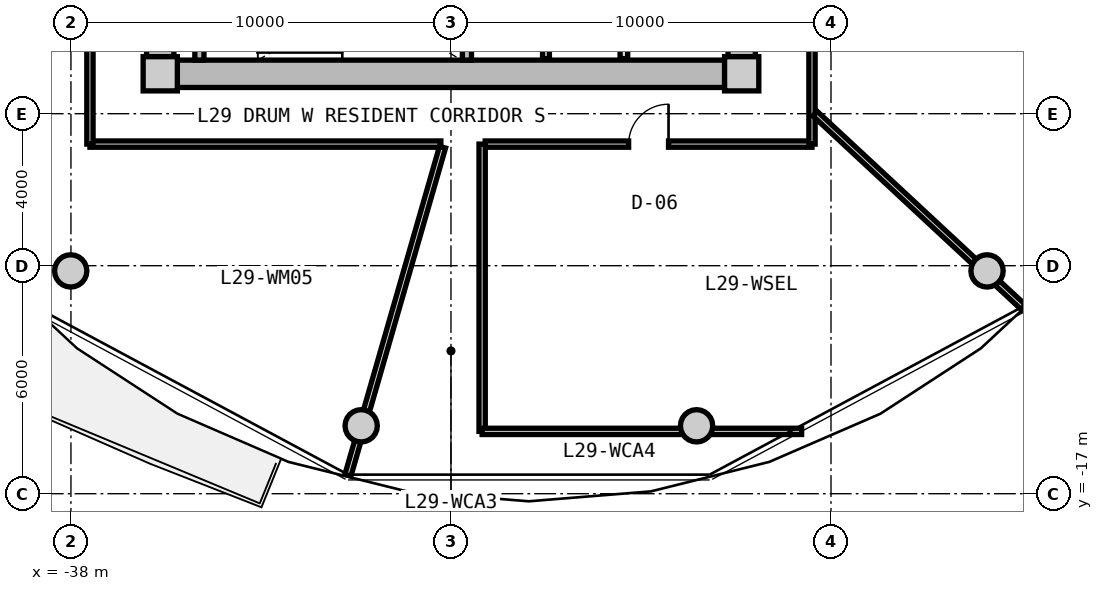
"""IFC4 building model, lengths in metres.
Left out: names, types, materials, properties, quantities, classifications, styles, units other than length and angle.
Written with IfcOpenShell. Run it as: python <this file> out.ifc"""

import sys

from ifc_helpers import new_model, si_unit, direction, frame, frame_2d, origin, origin_2d, place, context, subcontext, project, spatial, rectangle, circle, extrude, source, transform, mapped, element, fill, save


model = new_model("IFC4")
c1 = context("Model", 3, precision=1e-05, world=origin(), true_north=direction((0.0, 1.0)))
c2 = subcontext(c1, "Body", "Model", "MODEL_VIEW")
j1 = project(units=[si_unit("LENGTHUNIT", "METRE"), si_unit("PLANEANGLEUNIT", "RADIAN")], contexts=[c1])
p1 = place(None, origin())
s1 = spatial("IfcSite", under=j1, at=p1, CompositionType="ELEMENT")
p2 = place(p1, origin())
s2 = spatial("IfcBuilding", under=s1, at=p2, CompositionType="ELEMENT")
p3 = place(p2, frame((0.0, 0.0, 96.25)))
s3 = spatial("IfcBuildingStorey", under=s2, at=p3, CompositionType="ELEMENT", Elevation=96.25)
m1 = source(origin(), c2, "Body", "SweptSolid", [
    extrude(rectangle(XDim=0.9, YDim=0.9, at=origin_2d()), origin(), (0.0, 0.0, 1.0), 3.05),
])
for number, where, z_axis, x_axis in (
    (1, (-35.65, -5.95, 0.0), (0.0, 0.0, 1.0), (1.0, 0.0, 0.0)),
    (2, (-20.35, -5.95, 0.0), (0.0, 0.0, 1.0), (1.0, 0.0, 0.0)),
):
    element("IfcColumn", number, at=place(p3, frame(where, z_axis=z_axis, x_axis=x_axis)), inside=s3, PredefinedType="COLUMN", context=c2, shape_type="MappedRepresentation", body=[
        mapped(m1, transform((0.0, 0.0, 0.0), x_axis=(1.0, 0.0, 0.0), y_axis=(0.0, 1.0, 0.0), z_axis=(0.0, 0.0, 1.0), scale=1.0)),
    ])
m2 = source(origin(), c2, "Body", "SweptSolid", [
    extrude(rectangle(XDim=14.4, YDim=0.72, at=frame_2d((7.2, 0.0))), origin(), (0.0, 0.0, 1.0), 2.79),
])
p4 = place(p3, frame((-20.8, -5.95, 0.0), z_axis=(0.0, 0.0, 1.0), x_axis=(-1.0, 0.0, 0.0)))
e3 = element("IfcWall", 3, at=p4, inside=s3, PredefinedType="SHEAR", context=c2, shape_type="MappedRepresentation", body=[
    mapped(m2, transform((0.0, 0.0, 0.0), x_axis=(1.0, 0.0, 0.0), y_axis=(0.0, 1.0, 0.0), z_axis=(0.0, 0.0, 1.0), scale=1.0)),
])
m3 = source(origin(), c2, "Body", "SweptSolid", [
    extrude(rectangle(XDim=11.0, YDim=0.72, at=frame_2d((5.5, 0.0))), origin(), (0.0, 0.0, 1.0), 2.79),
])
p5 = place(p3, frame((-35.65, -5.5, 0.0), z_axis=(0.0, 0.0, 1.0), x_axis=(0.0, 1.0, 0.0)))
e4 = element("IfcWall", 4, at=p5, inside=s3, PredefinedType="SHEAR", context=c2, shape_type="MappedRepresentation", body=[
    mapped(m3, transform((0.0, 0.0, 0.0), x_axis=(1.0, 0.0, 0.0), y_axis=(0.0, 1.0, 0.0), z_axis=(0.0, 0.0, 1.0), scale=1.0)),
])
p6 = place(p5, frame((3.8, 0.0, 0.0)))
e5 = element("IfcOpeningElement", 5, at=p6, cuts=e4, PredefinedType="OPENING", context=c2, shape_type="SweptSolid", body=[
    extrude(rectangle(XDim=1.2, YDim=2.15, at=frame_2d((0.6, 1.075))), frame((0.0, 0.37, 0.0), z_axis=(0.0, -1.0, 0.0), x_axis=(1.0, 0.0, 0.0)), (0.0, 0.0, 1.0), 0.74),
])
p7 = place(p3, frame((-20.35, 5.5, 0.0), z_axis=(0.0, 0.0, 1.0), x_axis=(0.0, -1.0, 0.0)))
e6 = element("IfcWall", 6, at=p7, inside=s3, PredefinedType="SHEAR", context=c2, shape_type="MappedRepresentation", body=[
    mapped(m3, transform((0.0, 0.0, 0.0), x_axis=(1.0, 0.0, 0.0), y_axis=(0.0, 1.0, 0.0), z_axis=(0.0, 0.0, 1.0), scale=1.0)),
])
p8 = place(p7, frame((5.65, 0.0, 0.0)))
e7 = element("IfcOpeningElement", 7, at=p8, cuts=e6, PredefinedType="OPENING", context=c2, shape_type="SweptSolid", body=[
    extrude(rectangle(XDim=1.2, YDim=2.15, at=frame_2d((0.6, 1.075))), frame((0.0, 0.37, 0.0), z_axis=(0.0, -1.0, 0.0), x_axis=(1.0, 0.0, 0.0)), (0.0, 0.0, 1.0), 0.74),
])
p9 = place(p7, frame((9.3, 0.0, 0.0)))
e8 = element("IfcOpeningElement", 8, at=p9, cuts=e6, PredefinedType="OPENING", context=c2, shape_type="SweptSolid", body=[
    extrude(rectangle(XDim=1.0, YDim=2.1, at=frame_2d((0.5, 1.05))), frame((0.0, 0.37, 0.0), z_axis=(0.0, -1.0, 0.0), x_axis=(1.0, 0.0, 0.0)), (0.0, 0.0, 1.0), 0.74),
])
m4 = source(origin(), c2, "Body", "SweptSolid", [
    extrude(circle(Radius=0.425, at=origin_2d()), origin(), (0.0, 0.0, 1.0), 3.05),
])
for number, where, z_axis, x_axis in (
    (9, (-38.006, -11.137, 0.0), (0.0, 0.0, 1.0), (1.0, 0.0, 0.0)),
    (10, (-30.363, -15.213, 0.0), (0.0, 0.0, 1.0), (1.0, 0.0, 0.0)),
    (11, (-21.537, -15.213, 0.0), (0.0, 0.0, 1.0), (1.0, 0.0, 0.0)),
    (12, (-13.894, -11.137, 0.0), (0.0, 0.0, 1.0), (1.0, 0.0, 0.0)),
):
    element("IfcColumn", number, at=place(p3, frame(where, z_axis=z_axis, x_axis=x_axis)), inside=s3, PredefinedType="COLUMN", context=c2, shape_type="MappedRepresentation", body=[
        mapped(m4, transform((0.0, 0.0, 0.0), x_axis=(1.0, 0.0, 0.0), y_axis=(0.0, 1.0, 0.0), z_axis=(0.0, 0.0, 1.0), scale=1.0)),
    ])
m5 = source(origin(), c2, "Body", "SweptSolid", [
    extrude(rectangle(XDim=3.14, YDim=0.24, at=frame_2d((1.57, 0.0))), origin(), (0.0, 0.0, 1.0), 2.79),
])
for number, where, z_axis, x_axis in (
    (13, (-34.62, -5.59, 0.0), (0.0, 0.0, 1.0), (0.0, 1.0, 0.0)),
    (14, (-27.58, -5.59, 0.0), (0.0, 0.0, 1.0), (0.0, 1.0, 0.0)),
):
    element("IfcWall", number, at=place(p3, frame(where, z_axis=z_axis, x_axis=x_axis)), inside=s3, PredefinedType="PARTITIONING", context=c2, shape_type="MappedRepresentation", body=[
        mapped(m5, transform((0.0, 0.0, 0.0), x_axis=(1.0, 0.0, 0.0), y_axis=(0.0, 1.0, 0.0), z_axis=(0.0, 0.0, 1.0), scale=1.0)),
    ])
m6 = source(origin(), c2, "Body", "SweptSolid", [
    extrude(rectangle(XDim=3.8, YDim=0.2, at=frame_2d((1.9, 0.0))), origin(), (0.0, 0.0, 1.0), 2.775),
])
p10 = place(p3, frame((-23.45, -5.55, 0.0), z_axis=(0.0, 0.0, 1.0), x_axis=(0.0, 1.0, 0.0)))
e15 = element("IfcWall", 15, at=p10, inside=s3, PredefinedType="PARTITIONING", context=c2, shape_type="MappedRepresentation", body=[
    mapped(m6, transform((0.0, 0.0, 0.0), x_axis=(1.0, 0.0, 0.0), y_axis=(0.0, 1.0, 0.0), z_axis=(0.0, 0.0, 1.0), scale=1.0)),
])
m7 = source(origin(), c2, "Body", "SweptSolid", [
    extrude(rectangle(XDim=3.22, YDim=0.18, at=frame_2d((1.61, 0.0))), origin(), (0.0, 0.0, 1.0), 2.775),
])
p11 = place(p3, frame((-25.5, -5.55, 0.0), z_axis=(0.0, 0.0, 1.0), x_axis=(0.0, 1.0, 0.0)))
e16 = element("IfcWall", 16, at=p11, inside=s3, PredefinedType="PARTITIONING", context=c2, shape_type="MappedRepresentation", body=[
    mapped(m7, transform((0.0, 0.0, 0.0), x_axis=(1.0, 0.0, 0.0), y_axis=(0.0, 1.0, 0.0), z_axis=(0.0, 0.0, 1.0), scale=1.0)),
])
m8 = source(origin(), c2, "Body", "SweptSolid", [
    extrude(rectangle(XDim=8.6, YDim=0.165, at=frame_2d((4.3, 0.0))), origin(), (0.0, 0.0, 1.0), 2.775),
])
p12 = place(p3, frame((-18.5, -7.8, 0.0), z_axis=(0.0, 0.0, 1.0), x_axis=(-1.0, 0.0, 0.0)))
e17 = element("IfcWall", 17, at=p12, inside=s3, PredefinedType="PARTITIONING", context=c2, shape_type="MappedRepresentation", body=[
    mapped(m8, transform((0.0, 0.0, 0.0), x_axis=(1.0, 0.0, 0.0), y_axis=(0.0, 1.0, 0.0), z_axis=(0.0, 0.0, 1.0), scale=1.0)),
])
p13 = place(p12, frame((3.775, 0.0, 0.0)))
e18 = element("IfcOpeningElement", 18, at=p13, cuts=e17, PredefinedType="OPENING", context=c2, shape_type="SweptSolid", body=[
    extrude(rectangle(XDim=1.05, YDim=2.15, at=frame_2d((0.525, 1.075))), frame((0.0, 0.093, 0.0), z_axis=(0.0, -1.0, 0.0), x_axis=(1.0, 0.0, 0.0)), (0.0, 0.0, 1.0), 0.185),
])
m9 = source(origin(), c2, "Body", "SweptSolid", [
    extrude(rectangle(XDim=9.234, YDim=0.165, at=frame_2d((4.617, 0.0))), origin(), (0.0, 0.0, 1.0), 2.775),
])
p14 = place(p3, frame((-28.266, -7.8, 0.0), z_axis=(0.0, 0.0, 1.0), x_axis=(-1.0, 0.0, 0.0)))
e19 = element("IfcWall", 19, at=p14, inside=s3, PredefinedType="PARTITIONING", context=c2, shape_type="MappedRepresentation", body=[
    mapped(m9, transform((0.0, 0.0, 0.0), x_axis=(1.0, 0.0, 0.0), y_axis=(0.0, 1.0, 0.0), z_axis=(0.0, 0.0, 1.0), scale=1.0)),
])
m10 = source(origin(), c2, "Body", "SweptSolid", [
    extrude(rectangle(XDim=15.6, YDim=0.165, at=frame_2d((7.8, 0.0))), origin(), (0.0, 0.0, 1.0), 2.775),
])
p15 = place(p3, frame((-37.5, -7.8, 0.0), z_axis=(0.0, 0.0, 1.0), x_axis=(0.0, 1.0, 0.0)))
e20 = element("IfcWall", 20, at=p15, inside=s3, PredefinedType="PARTITIONING", context=c2, shape_type="MappedRepresentation", body=[
    mapped(m10, transform((0.0, 0.0, 0.0), x_axis=(1.0, 0.0, 0.0), y_axis=(0.0, 1.0, 0.0), z_axis=(0.0, 0.0, 1.0), scale=1.0)),
])
p16 = place(p15, frame((11.994, 0.0, 0.0)))
e21 = element("IfcOpeningElement", 21, at=p16, cuts=e20, PredefinedType="OPENING", context=c2, shape_type="SweptSolid", body=[
    extrude(rectangle(XDim=1.25, YDim=2.2, at=frame_2d((0.625, 1.1))), frame((0.0, 0.093, 0.0), z_axis=(0.0, -1.0, 0.0), x_axis=(1.0, 0.0, 0.0)), (0.0, 0.0, 1.0), 0.185),
])
p17 = place(p15, frame((4.867, 0.0, 0.0)))
e22 = element("IfcOpeningElement", 22, at=p17, cuts=e20, PredefinedType="OPENING", context=c2, shape_type="SweptSolid", body=[
    extrude(rectangle(XDim=1.25, YDim=2.2, at=frame_2d((0.625, 1.1))), frame((0.0, 0.093, 0.0), z_axis=(0.0, -1.0, 0.0), x_axis=(1.0, 0.0, 0.0)), (0.0, 0.0, 1.0), 0.185),
])
p18 = place(p3, frame((-18.5, 7.8, 0.0), z_axis=(0.0, 0.0, 1.0), x_axis=(0.0, -1.0, 0.0)))
e23 = element("IfcWall", 23, at=p18, inside=s3, PredefinedType="PARTITIONING", context=c2, shape_type="MappedRepresentation", body=[
    mapped(m10, transform((0.0, 0.0, 0.0), x_axis=(1.0, 0.0, 0.0), y_axis=(0.0, 1.0, 0.0), z_axis=(0.0, 0.0, 1.0), scale=1.0)),
])
p19 = place(p18, frame((9.734, 0.0, 0.0)))
e24 = element("IfcOpeningElement", 24, at=p19, cuts=e23, PredefinedType="OPENING", context=c2, shape_type="SweptSolid", body=[
    extrude(rectangle(XDim=1.25, YDim=2.2, at=frame_2d((0.625, 1.1))), frame((0.0, 0.093, 0.0), z_axis=(0.0, -1.0, 0.0), x_axis=(1.0, 0.0, 0.0)), (0.0, 0.0, 1.0), 0.185),
])
p20 = place(p18, frame((4.739, 0.0, 0.0)))
e25 = element("IfcOpeningElement", 25, at=p20, cuts=e23, PredefinedType="OPENING", context=c2, shape_type="SweptSolid", body=[
    extrude(rectangle(XDim=0.92, YDim=2.1, at=frame_2d((0.46, 1.05))), frame((0.0, 0.093, 0.0), z_axis=(0.0, -1.0, 0.0), x_axis=(1.0, 0.0, 0.0)), (0.0, 0.0, 1.0), 0.185),
])
p21 = place(p18, frame((2.096, 0.0, 0.0)))
e26 = element("IfcOpeningElement", 26, at=p21, cuts=e23, PredefinedType="OPENING", context=c2, shape_type="SweptSolid", body=[
    extrude(rectangle(XDim=0.92, YDim=2.1, at=frame_2d((0.46, 1.05))), frame((0.0, 0.093, 0.0), z_axis=(0.0, -1.0, 0.0), x_axis=(1.0, 0.0, 0.0)), (0.0, 0.0, 1.0), 0.185),
])
m11 = source(origin(), c2, "Body", "SweptSolid", [
    extrude(rectangle(XDim=8.989, YDim=0.165, at=frame_2d((4.495, 0.0))), origin(), (0.0, 0.0, 1.0), 2.275),
])
p22 = place(p3, frame((-28.222, -7.88, 0.0), z_axis=(0.0, 0.0, 1.0), x_axis=(-0.27702323008, -0.960863221274, 0.0)))
e27 = element("IfcWall", 27, at=p22, inside=s3, PredefinedType="PARTITIONING", context=c2, shape_type="MappedRepresentation", body=[
    mapped(m11, transform((0.0, 0.0, 0.0), x_axis=(1.0, 0.0, 0.0), y_axis=(0.0, 1.0, 0.0), z_axis=(0.0, 0.0, 1.0), scale=1.0)),
])
m12 = source(origin(), c2, "Body", "SweptSolid", [
    extrude(rectangle(XDim=7.482, YDim=0.165, at=frame_2d((3.741, 0.0))), origin(), (0.0, 0.0, 1.0), 2.275),
])
p23 = place(p3, frame((-18.42, -6.998, 0.0), z_axis=(0.0, 0.0, 1.0), x_axis=(0.732508698043, -0.680757671489, 0.0)))
e28 = element("IfcWall", 28, at=p23, inside=s3, PredefinedType="PARTITIONING", context=c2, shape_type="MappedRepresentation", body=[
    mapped(m12, transform((0.0, 0.0, 0.0), x_axis=(1.0, 0.0, 0.0), y_axis=(0.0, 1.0, 0.0), z_axis=(0.0, 0.0, 1.0), scale=1.0)),
])
m13 = source(origin(), c2, "Body", "SweptSolid", [
    extrude(rectangle(XDim=7.56, YDim=0.165, at=frame_2d((3.78, 0.0))), origin(), (0.0, 0.0, 1.0), 2.775),
])
p24 = place(p3, frame((-27.18, -15.36, 0.0), z_axis=(0.0, 0.0, 1.0), x_axis=(0.0, 1.0, 0.0)))
e29 = element("IfcWall", 29, at=p24, inside=s3, PredefinedType="PARTITIONING", context=c2, shape_type="MappedRepresentation", body=[
    mapped(m13, transform((0.0, 0.0, 0.0), x_axis=(1.0, 0.0, 0.0), y_axis=(0.0, 1.0, 0.0), z_axis=(0.0, 0.0, 1.0), scale=1.0)),
])
m14 = source(origin(), c2, "Body", "SweptSolid", [
    extrude(rectangle(XDim=8.407, YDim=0.165, at=frame_2d((4.204, 0.0))), origin(), (0.0, 0.0, 1.0), 2.275),
])
p25 = place(p3, frame((-27.18, -15.36, 0.0), z_axis=(0.0, 0.0, 1.0), x_axis=(1.0, 0.0, 0.0)))
e30 = element("IfcWall", 30, at=p25, inside=s3, PredefinedType="PARTITIONING", context=c2, shape_type="MappedRepresentation", body=[
    mapped(m14, transform((0.0, 0.0, 0.0), x_axis=(1.0, 0.0, 0.0), y_axis=(0.0, 1.0, 0.0), z_axis=(0.0, 0.0, 1.0), scale=1.0)),
])
m15 = source(origin(), c2, "Body", "SweptSolid", [
    extrude(rectangle(XDim=1.05, YDim=2.15, at=frame_2d((0.525, 1.075))), frame((0.0, 0.025, 0.0), z_axis=(0.0, -1.0, 0.0), x_axis=(1.0, 0.0, 0.0)), (0.0, 0.0, 1.0), 0.05),
])
p26 = place(p13, frame((1.05, 0.0, 0.0), z_axis=(0.0, 0.0, 1.0), x_axis=(-1.0, 0.0, 0.0)))
e31 = element("IfcDoor", 31, at=p26, inside=s3, OperationType="SINGLE_SWING_RIGHT", PredefinedType="DOOR", context=c2, shape_type="MappedRepresentation", body=[
    mapped(m15, transform((0.0, 0.0, 0.0), x_axis=(1.0, 0.0, 0.0), y_axis=(0.0, 1.0, 0.0), z_axis=(0.0, 0.0, 1.0), scale=1.0)),
])
fill(e18, e31)
save(model, sys.argv[1])
